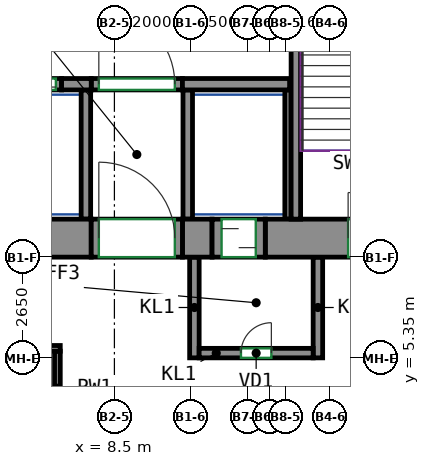
"""IFC4 building model, lengths in metres.
Left out: names, types, materials, properties, quantities, classifications, styles, units other than length and angle.
Written with IfcOpenShell. Run it as: python <this file> out.ifc"""

import sys

from ifc_helpers import new_model, si_unit, direction, frame, frame_2d, origin, place, context, subcontext, project, spatial, rectangle, extrude, source, transform, mapped, element, fill, save


model = new_model("IFC4")
c1 = context("Model", 3, precision=1e-05, world=origin(), true_north=direction((0.0, 1.0)))
c2 = subcontext(c1, "Body", "Model", "MODEL_VIEW")
j1 = project(units=[si_unit("LENGTHUNIT", "METRE"), si_unit("PLANEANGLEUNIT", "RADIAN")], contexts=[c1])
p1 = place(None, origin())
s1 = spatial("IfcSite", under=j1, at=p1, CompositionType="ELEMENT")
p2 = place(p1, origin())
s2 = spatial("IfcBuilding", under=s1, at=p2, CompositionType="ELEMENT")
p3 = place(p2, frame((0.0, 0.0, 59.0)))
s3 = spatial("IfcBuildingStorey", under=s2, at=p3, CompositionType="ELEMENT", Elevation=59.0)
m1 = source(origin(), c2, "Body", "SweptSolid", [
    extrude(rectangle(XDim=14.18, YDim=1.0, at=frame_2d((7.09, 0.0))), origin(), (0.0, 0.0, 1.0), 3.8),
])
p4 = place(p3, frame((-6.29, 8.5, 0.0), z_axis=(0.0, 0.0, 1.0), x_axis=(1.0, 0.0, 0.0)))
e1 = element("IfcWall", 1, at=p4, inside=s3, PredefinedType="SHEAR", context=c2, shape_type="MappedRepresentation", body=[
    mapped(m1, transform((0.0, 0.0, 0.0))),
])
m2 = source(origin(), c2, "Body", "SweptSolid", [
    extrude(rectangle(XDim=0.78, YDim=1.0, at=frame_2d((0.39, 0.0))), origin(), (0.0, 0.0, 1.0), 3.8),
])
p5 = place(p3, frame((10.29, 8.5, 0.0), z_axis=(0.0, 0.0, 1.0), x_axis=(1.0, 0.0, 0.0)))
e2 = element("IfcWall", 2, at=p5, inside=s3, PredefinedType="SHEAR", context=c2, shape_type="MappedRepresentation", body=[
    mapped(m2, transform((0.0, 0.0, 0.0))),
])
m3 = source(origin(), c2, "Body", "SweptSolid", [
    extrude(rectangle(XDim=5.63, YDim=1.0, at=frame_2d((2.815, 0.0))), origin(), (0.0, 0.0, 1.0), 3.8),
])
p6 = place(p3, frame((12.47, 8.5, 0.0), z_axis=(0.0, 0.0, 1.0), x_axis=(1.0, 0.0, 0.0)))
e3 = element("IfcWall", 3, at=p6, inside=s3, PredefinedType="SHEAR", context=c2, shape_type="MappedRepresentation", body=[
    mapped(m3, transform((0.0, 0.0, 0.0))),
])
p7 = place(p6, frame((2.18, 0.0, 0.0)))
e4 = element("IfcOpeningElement", 4, at=p7, cuts=e3, PredefinedType="OPENING", context=c2, shape_type="SweptSolid", body=[
    extrude(rectangle(XDim=1.2, YDim=2.1, at=frame_2d((0.6, 1.05))), frame((0.0, 0.51, 0.0), z_axis=(0.0, -1.0, 0.0), x_axis=(1.0, 0.0, 0.0)), (0.0, 0.0, 1.0), 1.02),
])
m4 = source(origin(), c2, "Body", "SweptSolid", [
    extrude(rectangle(XDim=7.75, YDim=0.25, at=frame_2d((3.875, 0.0))), origin(), (0.0, 0.0, 1.0), 3.8),
])
p8 = place(p3, frame((13.275, 9.0, 0.0), z_axis=(0.0, 0.0, 1.0), x_axis=(0.0, 1.0, 0.0)))
e5 = element("IfcWall", 5, at=p8, inside=s3, PredefinedType="SHEAR", context=c2, shape_type="MappedRepresentation", body=[
    mapped(m4, transform((0.0, 0.0, 0.0))),
])
m5 = source(origin(), c2, "Body", "SweptSolid", [
    extrude(rectangle(XDim=0.78, YDim=0.3, at=frame_2d((0.39, 0.0))), origin(), (0.0, 0.0, 1.0), 3.8),
])
p9 = place(p3, frame((7.11, 12.55, 0.0), z_axis=(0.0, 0.0, 1.0), x_axis=(1.0, 0.0, 0.0)))
e6 = element("IfcWall", 6, at=p9, inside=s3, PredefinedType="SHEAR", context=c2, shape_type="MappedRepresentation", body=[
    mapped(m5, transform((0.0, 0.0, 0.0))),
])
m6 = source(origin(), c2, "Body", "SweptSolid", [
    extrude(rectangle(XDim=2.82, YDim=0.3, at=frame_2d((1.41, 0.0))), origin(), (0.0, 0.0, 1.0), 3.8),
])
p10 = place(p3, frame((10.29, 12.55, 0.0), z_axis=(0.0, 0.0, 1.0), x_axis=(1.0, 0.0, 0.0)))
e7 = element("IfcWall", 7, at=p10, inside=s3, PredefinedType="SHEAR", context=c2, shape_type="MappedRepresentation", body=[
    mapped(m6, transform((0.0, 0.0, 0.0))),
])
m7 = source(origin(), c2, "Body", "SweptSolid", [
    extrude(rectangle(XDim=1.4, YDim=0.3, at=frame_2d((0.7, 0.0))), origin(), (0.0, 0.0, 1.0), 3.8),
])
p11 = place(p3, frame((5.71, 12.55, 0.0), z_axis=(0.0, 0.0, 1.0), x_axis=(1.0, 0.0, 0.0)))
e8 = element("IfcWall", 8, at=p11, inside=s3, PredefinedType="PARTITIONING", context=c2, shape_type="MappedRepresentation", body=[
    mapped(m7, transform((0.0, 0.0, 0.0))),
])
p12 = place(p11, frame((0.15, 0.0, 0.0)))
e9 = element("IfcOpeningElement", 9, at=p12, cuts=e8, PredefinedType="OPENING", context=c2, shape_type="SweptSolid", body=[
    extrude(rectangle(XDim=1.1, YDim=2.1, at=frame_2d((0.55, 1.05))), frame((0.0, 0.16, 0.0), z_axis=(0.0, -1.0, 0.0), x_axis=(1.0, 0.0, 0.0)), (0.0, 0.0, 1.0), 0.32),
])
m8 = source(origin(), c2, "Body", "SweptSolid", [
    extrude(rectangle(XDim=2.4, YDim=0.3, at=frame_2d((1.2, 0.0))), origin(), (0.0, 0.0, 1.0), 3.8),
])
p13 = place(p3, frame((7.89, 12.55, 0.0), z_axis=(0.0, 0.0, 1.0), x_axis=(1.0, 0.0, 0.0)))
e10 = element("IfcWall", 10, at=p13, inside=s3, PredefinedType="PARTITIONING", context=c2, shape_type="MappedRepresentation", body=[
    mapped(m8, transform((0.0, 0.0, 0.0))),
])
p14 = place(p13, frame((0.2, 0.0, 0.0)))
e11 = element("IfcOpeningElement", 11, at=p14, cuts=e10, PredefinedType="OPENING", context=c2, shape_type="SweptSolid", body=[
    extrude(rectangle(XDim=2.0, YDim=2.1, at=frame_2d((1.0, 1.05))), frame((0.0, 0.16, 0.0), z_axis=(0.0, -1.0, 0.0), x_axis=(1.0, 0.0, 0.0)), (0.0, 0.0, 1.0), 0.32),
])
m9 = source(origin(), c2, "Body", "SweptSolid", [
    extrude(rectangle(XDim=2.65, YDim=0.25, at=frame_2d((1.325, 0.0))), origin(), (0.0, 0.0, 1.0), 3.8),
])
for number, where, z_axis, x_axis in (
    (12, (10.605, 5.35, 0.0), (0.0, 0.0, 1.0), (0.0, 1.0, 0.0)),
    (13, (13.855, 5.35, 0.0), (0.0, 0.0, 1.0), (0.0, 1.0, 0.0)),
):
    element("IfcWall", number, at=place(p3, frame(where, z_axis=z_axis, x_axis=x_axis)), inside=s3, PredefinedType="PARTITIONING", context=c2, shape_type="MappedRepresentation", body=[
        mapped(m9, transform((0.0, 0.0, 0.0))),
    ])
m10 = source(origin(), c2, "Body", "SweptSolid", [
    extrude(rectangle(XDim=3.0, YDim=0.25, at=frame_2d((1.5, 0.0))), origin(), (0.0, 0.0, 1.0), 3.8),
])
p15 = place(p3, frame((10.73, 5.475, 0.0), z_axis=(0.0, 0.0, 1.0), x_axis=(1.0, 0.0, 0.0)))
e14 = element("IfcWall", 14, at=p15, inside=s3, PredefinedType="PARTITIONING", context=c2, shape_type="MappedRepresentation", body=[
    mapped(m10, transform((0.0, 0.0, 0.0))),
])
p16 = place(p15, frame((1.1, 0.0, 0.0)))
e15 = element("IfcOpeningElement", 15, at=p16, cuts=e14, PredefinedType="OPENING", context=c2, shape_type="SweptSolid", body=[
    extrude(rectangle(XDim=0.8, YDim=2.0, at=frame_2d((0.4, 1.0))), frame((0.0, 0.135, 0.0), z_axis=(0.0, -1.0, 0.0), x_axis=(1.0, 0.0, 0.0)), (0.0, 0.0, 1.0), 0.27),
])
m11 = source(origin(), c2, "Body", "SweptSolid", [
    extrude(rectangle(XDim=3.4, YDim=0.25, at=frame_2d((1.7, 0.0))), origin(), (0.0, 0.0, 1.0), 3.8),
])
p17 = place(p3, frame((10.43, 9.0, 0.0), z_axis=(0.0, 0.0, 1.0), x_axis=(0.0, 1.0, 0.0)))
e16 = element("IfcWall", 16, at=p17, inside=s3, PredefinedType="PARTITIONING", context=c2, shape_type="MappedRepresentation", body=[
    mapped(m11, transform((0.0, 0.0, 0.0))),
])
m12 = source(origin(), c2, "Body", "SweptSolid", [
    extrude(rectangle(XDim=3.4, YDim=0.165, at=frame_2d((1.7, 0.0))), origin(), (0.0, 0.0, 1.0), 3.8),
])
p18 = place(p3, frame((13.067, 9.0, 0.0), z_axis=(0.0, 0.0, 1.0), x_axis=(0.0, 1.0, 0.0)))
e17 = element("IfcWall", 17, at=p18, inside=s3, PredefinedType="PARTITIONING", context=c2, shape_type="MappedRepresentation", body=[
    mapped(m12, transform((0.0, 0.0, 0.0))),
])
p19 = place(p3, frame((7.75, 9.0, 0.0), z_axis=(0.0, 0.0, 1.0), x_axis=(0.0, 1.0, 0.0)))
e18 = element("IfcWall", 18, at=p19, inside=s3, PredefinedType="PARTITIONING", context=c2, shape_type="MappedRepresentation", body=[
    mapped(m11, transform((0.0, 0.0, 0.0))),
])
m13 = source(origin(), c2, "Body", "SweptSolid", [
    extrude(rectangle(XDim=2.4, YDim=1.0, at=frame_2d((1.2, 0.0))), origin(), (0.0, 0.0, 1.0), 2.7),
])
p20 = place(p3, frame((7.89, 8.5, 0.0), z_axis=(0.0, 0.0, 1.0), x_axis=(1.0, 0.0, 0.0)))
e19 = element("IfcWall", 19, at=p20, inside=s3, PredefinedType="PARTITIONING", context=c2, shape_type="MappedRepresentation", body=[
    mapped(m13, transform((0.0, 0.0, 0.0))),
])
p21 = place(p20, frame((0.2, 0.0, 0.0)))
e20 = element("IfcOpeningElement", 20, at=p21, cuts=e19, PredefinedType="OPENING", context=c2, shape_type="SweptSolid", body=[
    extrude(rectangle(XDim=2.0, YDim=2.1, at=frame_2d((1.0, 1.05))), frame((0.0, 0.51, 0.0), z_axis=(0.0, -1.0, 0.0), x_axis=(1.0, 0.0, 0.0)), (0.0, 0.0, 1.0), 1.02),
])
m14 = source(origin(), c2, "Body", "SweptSolid", [
    extrude(rectangle(XDim=1.4, YDim=1.0, at=frame_2d((0.7, 0.0))), origin(), (0.0, 0.0, 1.0), 2.7),
])
p22 = place(p3, frame((11.07, 8.5, 0.0), z_axis=(0.0, 0.0, 1.0), x_axis=(1.0, 0.0, 0.0)))
e21 = element("IfcWall", 21, at=p22, inside=s3, PredefinedType="PARTITIONING", context=c2, shape_type="MappedRepresentation", body=[
    mapped(m14, transform((0.0, 0.0, 0.0))),
])
p23 = place(p22, frame((0.25, 0.0, 0.0)))
e22 = element("IfcOpeningElement", 22, at=p23, cuts=e21, PredefinedType="OPENING", context=c2, shape_type="SweptSolid", body=[
    extrude(rectangle(XDim=0.9, YDim=2.1, at=frame_2d((0.45, 1.05))), frame((0.0, 0.51, 0.0), z_axis=(0.0, -1.0, 0.0), x_axis=(1.0, 0.0, 0.0)), (0.0, 0.0, 1.0), 1.02),
])
p24 = place(p3, frame((7.0, 5.525, 0.0), z_axis=(0.0, 0.0, 1.0), x_axis=(0.0, -1.0, 0.0)))
e23 = element("IfcWall", 23, at=p24, inside=s3, PredefinedType="PARTITIONING", context=c2, shape_type="SweptSolid", body=[
    extrude(rectangle(XDim=1.95, YDim=0.15, at=frame_2d((0.975, 0.0))), origin(), (0.0, 0.0, 1.0), 3.8),
])
p25 = place(p3, frame((-3.575, 5.6, 0.0), z_axis=(0.0, 0.0, 1.0), x_axis=(1.0, 0.0, 0.0)))
e24 = element("IfcWall", 24, at=p25, inside=s3, PredefinedType="PARTITIONING", context=c2, shape_type="SweptSolid", body=[
    extrude(rectangle(XDim=10.65, YDim=0.15, at=frame_2d((5.325, 0.0))), origin(), (0.0, 0.0, 1.0), 3.8),
])
p26 = place(p25, frame((3.216, 0.0, 0.0)))
e25 = element("IfcOpeningElement", 25, at=p26, cuts=e24, PredefinedType="OPENING", context=c2, shape_type="SweptSolid", body=[
    extrude(rectangle(XDim=1.0, YDim=2.1, at=frame_2d((0.5, 1.05))), frame((0.0, 0.085, 0.0), z_axis=(0.0, -1.0, 0.0), x_axis=(1.0, 0.0, 0.0)), (0.0, 0.0, 1.0), 0.17),
])
p27 = place(p14, origin())
e26 = element("IfcDoor", 26, at=p27, inside=s3, OperationType="DOUBLE_DOOR_SINGLE_SWING", PredefinedType="DOOR", context=c2, shape_type="SweptSolid", body=[
    extrude(rectangle(XDim=2.0, YDim=2.1, at=frame_2d((1.0, 1.05))), frame((0.0, 0.025, 0.0), z_axis=(0.0, -1.0, 0.0), x_axis=(1.0, 0.0, 0.0)), (0.0, 0.0, 1.0), 0.05),
])
fill(e11, e26)
p28 = place(p21, origin())
e27 = element("IfcDoor", 27, at=p28, inside=s3, OperationType="DOUBLE_DOOR_SINGLE_SWING", PredefinedType="DOOR", context=c2, shape_type="SweptSolid", body=[
    extrude(rectangle(XDim=2.0, YDim=2.1, at=frame_2d((1.0, 1.05))), frame((0.0, 0.405, 0.0), z_axis=(0.0, -1.0, 0.0), x_axis=(1.0, 0.0, 0.0)), (0.0, 0.0, 1.0), 0.05),
])
fill(e20, e27)
p29 = place(p16, origin())
e28 = element("IfcDoor", 28, at=p29, inside=s3, OperationType="SINGLE_SWING_RIGHT", PredefinedType="DOOR", context=c2, shape_type="SweptSolid", body=[
    extrude(rectangle(XDim=0.8, YDim=2.0, at=frame_2d((0.4, 1.0))), frame((0.0, 0.025, 0.0), z_axis=(0.0, -1.0, 0.0), x_axis=(1.0, 0.0, 0.0)), (0.0, 0.0, 1.0), 0.05),
])
fill(e15, e28)
p30 = place(p23, origin())
e29 = element("IfcDoor", 29, at=p30, inside=s3, OperationType="SLIDING_TO_LEFT", PredefinedType="DOOR", context=c2, shape_type="SweptSolid", body=[
    extrude(rectangle(XDim=0.9, YDim=2.1, at=frame_2d((0.45, 1.05))), frame((0.0, 0.405, 0.0), z_axis=(0.0, -1.0, 0.0), x_axis=(1.0, 0.0, 0.0)), (0.0, 0.0, 1.0), 0.05),
])
fill(e22, e29)
p31 = place(p12, origin())
e30 = element("IfcDoor", 30, at=p31, inside=s3, OperationType="DOUBLE_DOOR_SLIDING", PredefinedType="DOOR", context=c2, shape_type="SweptSolid", body=[
    extrude(rectangle(XDim=1.1, YDim=2.1, at=frame_2d((0.55, 1.05))), frame((0.0, 0.025, 0.0), z_axis=(0.0, -1.0, 0.0), x_axis=(1.0, 0.0, 0.0)), (0.0, 0.0, 1.0), 0.05),
])
fill(e9, e30)
p32 = place(p7, origin())
e31 = element("IfcDoor", 31, at=p32, inside=s3, OperationType="DOUBLE_DOOR_SINGLE_SWING", PredefinedType="DOOR", context=c2, shape_type="SweptSolid", body=[
    extrude(rectangle(XDim=1.2, YDim=2.1, at=frame_2d((0.6, 1.05))), frame((0.0, 0.405, 0.0), z_axis=(0.0, -1.0, 0.0), x_axis=(1.0, 0.0, 0.0)), (0.0, 0.0, 1.0), 0.05),
])
fill(e4, e31)
save(model, sys.argv[1])
